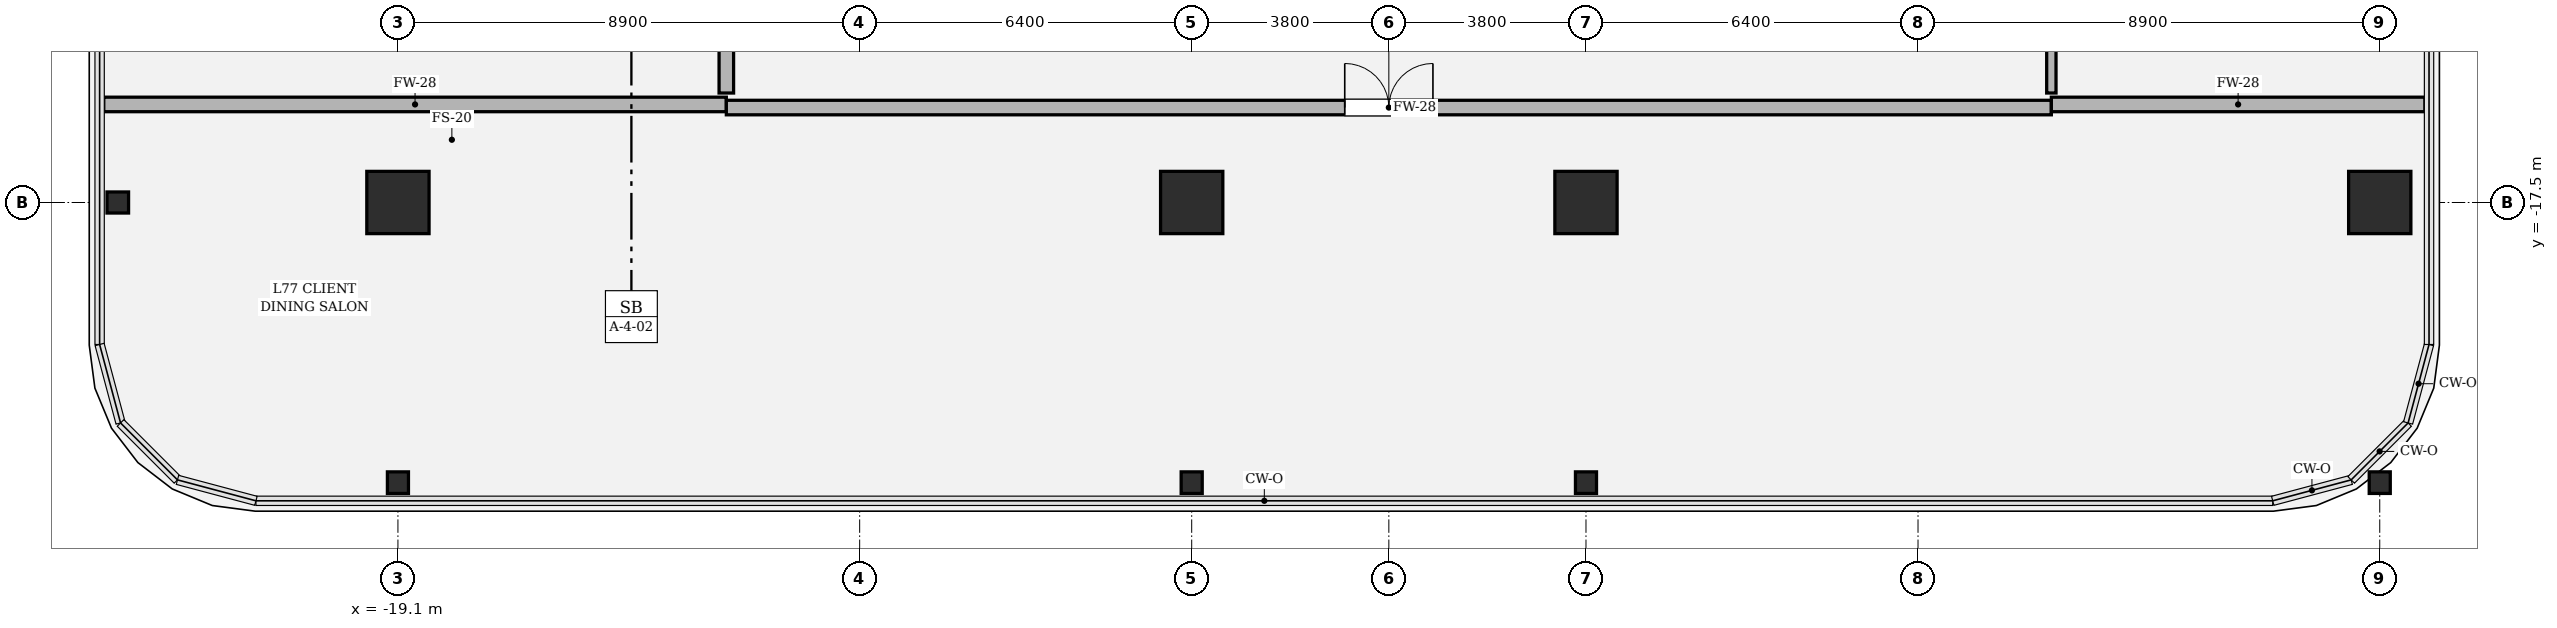
"""IFC4 building model, lengths in metres.
Left out: names, types, materials, properties, quantities, classifications, styles, units other than length and angle.
Written with IfcOpenShell. Run it as: python <this file> out.ifc"""

import sys

from ifc_helpers import new_model, si_unit, direction, frame, frame_2d, origin, origin_2d, place, context, subcontext, project, spatial, rectangle, hollow_rectangle, i_section, extrude, element, fill, save


model = new_model("IFC4")
c1 = context("Model", 3, precision=1e-05, world=origin(), true_north=direction((0.0, 1.0)))
c2 = subcontext(c1, "Body", "Model", "MODEL_VIEW")
j1 = project(units=[si_unit("LENGTHUNIT", "METRE"), si_unit("PLANEANGLEUNIT", "RADIAN")], contexts=[c1])
p1 = place(None, origin())
s1 = spatial("IfcSite", under=j1, at=p1, CompositionType="ELEMENT")
p2 = place(p1, origin())
s2 = spatial("IfcBuilding", under=s1, at=p2, CompositionType="ELEMENT")
p3 = place(p2, frame((0.0, 0.0, 325.8)))
s3 = spatial("IfcBuildingStorey", under=s2, at=p3, CompositionType="ELEMENT", Elevation=325.8)
for number, where, z_axis, x_axis in (
    (1, (-19.1, -17.5, 0.0), (0.0, 0.0, 1.0), (1.0, 0.0, 0.0)),
    (2, (-3.8, -17.5, 0.0), (0.0, 0.0, 1.0), (1.0, 0.0, 0.0)),
    (3, (3.8, -17.5, 0.0), (0.0, 0.0, 1.0), (1.0, 0.0, 0.0)),
    (4, (19.1, -17.5, 0.0), (0.0, 0.0, 1.0), (1.0, 0.0, 0.0)),
):
    element("IfcColumn", number, at=place(p3, frame(where, z_axis=z_axis, x_axis=x_axis)), inside=s3, PredefinedType="COLUMN", context=c2, shape_type="SweptSolid", body=[
        extrude(hollow_rectangle(XDim=1.2, YDim=1.2, WallThickness=0.035, at=origin_2d()), origin(), (0.0, 0.0, 1.0), 4.2),
    ])
for number, where, z_axis, x_axis in (
    (5, (-19.1, -22.9, 0.0), (0.0, 0.0, 1.0), (1.0, 0.0, 0.0)),
    (6, (-3.8, -22.9, 0.0), (0.0, 0.0, 1.0), (1.0, 0.0, 0.0)),
    (7, (3.8, -22.9, 0.0), (0.0, 0.0, 1.0), (1.0, 0.0, 0.0)),
    (8, (19.1, -22.9, 0.0), (0.0, 0.0, 1.0), (1.0, 0.0, 0.0)),
    (9, (-24.5, -17.5, 0.0), (0.0, 0.0, 1.0), (0.0, 1.0, 0.0)),
):
    element("IfcColumn", number, at=place(p3, frame(where, z_axis=z_axis, x_axis=x_axis)), inside=s3, PredefinedType="COLUMN", context=c2, shape_type="SweptSolid", body=[
        extrude(i_section(OverallWidth=0.406, OverallDepth=0.416, WebThickness=0.029, FlangeThickness=0.048, FilletRadius=0.018, at=origin_2d()), origin(), (0.0, 0.0, 1.0), 4.198),
    ])
p4 = place(p3, frame((-24.77, -15.61, 0.0), z_axis=(0.0, 0.0, 1.0), x_axis=(1.0, 0.0, 0.0)))
e10 = element("IfcWall", 10, at=p4, inside=s3, PredefinedType="SOLIDWALL", context=c2, shape_type="SweptSolid", body=[
    extrude(rectangle(XDim=12.0, YDim=0.28, at=frame_2d((6.0, 0.0))), origin(), (0.0, 0.0, 1.0), 2.714),
])
p5 = place(p3, frame((-12.77, -15.67, 0.0), z_axis=(0.0, 0.0, 1.0), x_axis=(1.0, 0.0, 0.0)))
e11 = element("IfcWall", 11, at=p5, inside=s3, PredefinedType="SOLIDWALL", context=c2, shape_type="SweptSolid", body=[
    extrude(rectangle(XDim=25.54, YDim=0.28, at=frame_2d((12.77, 0.0))), origin(), (0.0, 0.0, 1.0), 3.394),
])
p6 = place(p5, frame((11.92, 0.0, 0.0)))
e12 = element("IfcOpeningElement", 12, at=p6, cuts=e11, PredefinedType="OPENING", context=c2, shape_type="SweptSolid", body=[
    extrude(rectangle(XDim=1.7, YDim=2.3, at=frame_2d((0.85, 1.15))), frame((0.0, 0.15, 0.0), z_axis=(0.0, -1.0, 0.0), x_axis=(1.0, 0.0, 0.0)), (0.0, 0.0, 1.0), 0.3),
])
p7 = place(p3, frame((12.77, -15.61, 0.0), z_axis=(0.0, 0.0, 1.0), x_axis=(1.0, 0.0, 0.0)))
e13 = element("IfcWall", 13, at=p7, inside=s3, PredefinedType="SOLIDWALL", context=c2, shape_type="SweptSolid", body=[
    extrude(rectangle(XDim=7.2, YDim=0.28, at=frame_2d((3.6, 0.0))), origin(), (0.0, 0.0, 1.0), 3.394),
])
p8 = place(p3, frame((-12.77, -13.38, 0.0), z_axis=(0.0, 0.0, 1.0), x_axis=(0.0, -1.0, 0.0)))
e14 = element("IfcWall", 14, at=p8, inside=s3, PredefinedType="SOLIDWALL", context=c2, shape_type="SweptSolid", body=[
    extrude(rectangle(XDim=2.01, YDim=0.28, at=frame_2d((1.005, 0.0))), origin(), (0.0, 0.0, 1.0), 3.634),
])
p9 = place(p3, frame((12.77, -15.39, 0.0), z_axis=(0.0, 0.0, 1.0), x_axis=(0.0, 1.0, 0.0)))
e15 = element("IfcWall", 15, at=p9, inside=s3, PredefinedType="PARTITIONING", context=c2, shape_type="SweptSolid", body=[
    extrude(rectangle(XDim=2.01, YDim=0.18, at=frame_2d((1.005, 0.0))), origin(), (0.0, 0.0, 1.0), 3.634),
])
p10 = place(p6, origin())
e16 = element("IfcDoor", 16, at=p10, inside=s3, OperationType="DOUBLE_DOOR_SINGLE_SWING", PredefinedType="DOOR", context=c2, shape_type="SweptSolid", body=[
    extrude(rectangle(XDim=1.7, YDim=2.3, at=frame_2d((0.85, 1.15))), frame((0.0, 0.025, 0.0), z_axis=(0.0, -1.0, 0.0), x_axis=(1.0, 0.0, 0.0)), (0.0, 0.0, 1.0), 0.05),
])
fill(e12, e16)
save(model, sys.argv[1])
